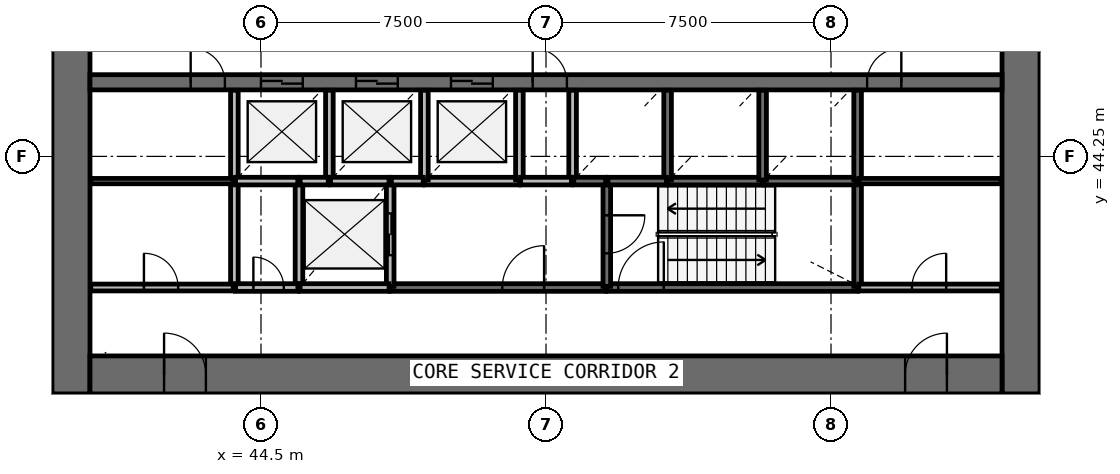
"""IFC4 building model, lengths in metres.
Left out: names, types, materials, properties, quantities, classifications, styles, units other than length and angle.
Written with IfcOpenShell. Run it as: python <this file> out.ifc"""

import sys

from ifc_helpers import new_model, si_unit, direction, frame, frame_2d, origin, place, context, subcontext, project, spatial, rectangle, extrude, source, transform, mapped, element, fill, save


model = new_model("IFC4")
c1 = context("Model", 3, precision=1e-05, world=origin(), true_north=direction((0.0, 1.0)))
c2 = subcontext(c1, "Body", "Model", "MODEL_VIEW")
j1 = project(units=[si_unit("LENGTHUNIT", "METRE"), si_unit("PLANEANGLEUNIT", "RADIAN")], contexts=[c1])
p1 = place(None, origin())
s1 = spatial("IfcSite", under=j1, at=p1, CompositionType="ELEMENT")
p2 = place(p1, origin())
s2 = spatial("IfcBuilding", under=s1, at=p2, CompositionType="ELEMENT")
p3 = place(p2, frame((0.0, 0.0, 71.0)))
s3 = spatial("IfcBuildingStorey", under=s2, at=p3, CompositionType="ELEMENT", Elevation=71.0)
p4 = place(p3, frame((64.5, 38.0, 0.0), z_axis=(0.0, 0.0, 1.0), x_axis=(0.0, 1.0, 0.0)))
e1 = element("IfcWall", 1, at=p4, inside=s3, PredefinedType="SHEAR", context=c2, shape_type="SweptSolid", body=[
    extrude(rectangle(XDim=20.0, YDim=1.0, at=frame_2d((10.0, 0.0))), origin(), (0.0, 0.0, 1.0), 4.4),
])
p5 = place(p4, frame((9.1, 0.0, 0.0)))
e2 = element("IfcOpeningElement", 2, at=p5, cuts=e1, PredefinedType="OPENING", context=c2, shape_type="SweptSolid", body=[
    extrude(rectangle(XDim=1.8, YDim=2.1, at=frame_2d((0.9, 1.05))), frame((0.0, 0.51, 0.0), z_axis=(0.0, -1.0, 0.0), x_axis=(1.0, 0.0, 0.0)), (0.0, 0.0, 1.0), 1.02),
])
p6 = place(p3, frame((39.5, 58.0, 0.0), z_axis=(0.0, 0.0, 1.0), x_axis=(0.0, -1.0, 0.0)))
e3 = element("IfcWall", 3, at=p6, inside=s3, PredefinedType="SHEAR", context=c2, shape_type="SweptSolid", body=[
    extrude(rectangle(XDim=20.0, YDim=1.0, at=frame_2d((10.0, 0.0))), origin(), (0.0, 0.0, 1.0), 4.4),
])
p7 = place(p6, frame((9.1, 0.0, 0.0)))
e4 = element("IfcOpeningElement", 4, at=p7, cuts=e3, PredefinedType="OPENING", context=c2, shape_type="SweptSolid", body=[
    extrude(rectangle(XDim=1.8, YDim=2.1, at=frame_2d((0.9, 1.05))), frame((0.0, 0.51, 0.0), z_axis=(0.0, -1.0, 0.0), x_axis=(1.0, 0.0, 0.0)), (0.0, 0.0, 1.0), 1.02),
])
p8 = place(p3, frame((40.0, 38.5, 0.0), z_axis=(0.0, 0.0, 1.0), x_axis=(1.0, 0.0, 0.0)))
e5 = element("IfcWall", 5, at=p8, inside=s3, PredefinedType="SHEAR", context=c2, shape_type="SweptSolid", body=[
    extrude(rectangle(XDim=24.0, YDim=1.0, at=frame_2d((12.0, 0.0))), origin(), (0.0, 0.0, 1.0), 4.4),
])
p9 = place(p8, frame((21.45, 0.0, 0.0)))
e6 = element("IfcOpeningElement", 6, at=p9, cuts=e5, PredefinedType="OPENING", context=c2, shape_type="SweptSolid", body=[
    extrude(rectangle(XDim=1.1, YDim=2.1, at=frame_2d((0.55, 1.05))), frame((0.0, 0.51, 0.0), z_axis=(0.0, -1.0, 0.0), x_axis=(1.0, 0.0, 0.0)), (0.0, 0.0, 1.0), 1.02),
])
p10 = place(p8, frame((1.95, 0.0, 0.0)))
e7 = element("IfcOpeningElement", 7, at=p10, cuts=e5, PredefinedType="OPENING", context=c2, shape_type="SweptSolid", body=[
    extrude(rectangle(XDim=1.1, YDim=2.1, at=frame_2d((0.55, 1.05))), frame((0.0, 0.51, 0.0), z_axis=(0.0, -1.0, 0.0), x_axis=(1.0, 0.0, 0.0)), (0.0, 0.0, 1.0), 1.02),
])
p11 = place(p3, frame((40.0, 46.2, 0.0), z_axis=(0.0, 0.0, 1.0), x_axis=(1.0, 0.0, 0.0)))
e8 = element("IfcWall", 8, at=p11, inside=s3, PredefinedType="SHEAR", context=c2, shape_type="SweptSolid", body=[
    extrude(rectangle(XDim=24.0, YDim=0.4, at=frame_2d((12.0, 0.0))), origin(), (0.0, 0.0, 1.0), 4.4),
])
p12 = place(p11, frame((4.5, 0.0, 0.0)))
e9 = element("IfcOpeningElement", 9, at=p12, cuts=e8, PredefinedType="OPENING", context=c2, shape_type="SweptSolid", body=[
    extrude(rectangle(XDim=1.1, YDim=2.1, at=frame_2d((0.55, 1.05))), frame((0.0, 0.21, 0.0), z_axis=(0.0, -1.0, 0.0), x_axis=(1.0, 0.0, 0.0)), (0.0, 0.0, 1.0), 0.42),
])
p13 = place(p11, frame((7.0, 0.0, 0.0)))
e10 = element("IfcOpeningElement", 10, at=p13, cuts=e8, PredefinedType="OPENING", context=c2, shape_type="SweptSolid", body=[
    extrude(rectangle(XDim=1.1, YDim=2.1, at=frame_2d((0.55, 1.05))), frame((0.0, 0.21, 0.0), z_axis=(0.0, -1.0, 0.0), x_axis=(1.0, 0.0, 0.0)), (0.0, 0.0, 1.0), 0.42),
])
p14 = place(p11, frame((9.5, 0.0, 0.0)))
e11 = element("IfcOpeningElement", 11, at=p14, cuts=e8, PredefinedType="OPENING", context=c2, shape_type="SweptSolid", body=[
    extrude(rectangle(XDim=1.1, YDim=2.1, at=frame_2d((0.55, 1.05))), frame((0.0, 0.21, 0.0), z_axis=(0.0, -1.0, 0.0), x_axis=(1.0, 0.0, 0.0)), (0.0, 0.0, 1.0), 0.42),
])
p15 = place(p11, frame((20.45, 0.0, 0.0)))
e12 = element("IfcOpeningElement", 12, at=p15, cuts=e8, PredefinedType="OPENING", context=c2, shape_type="SweptSolid", body=[
    extrude(rectangle(XDim=0.9, YDim=2.1, at=frame_2d((0.45, 1.05))), frame((0.0, 0.21, 0.0), z_axis=(0.0, -1.0, 0.0), x_axis=(1.0, 0.0, 0.0)), (0.0, 0.0, 1.0), 0.42),
])
p16 = place(p11, frame((2.65, 0.0, 0.0)))
e13 = element("IfcOpeningElement", 13, at=p16, cuts=e8, PredefinedType="OPENING", context=c2, shape_type="SweptSolid", body=[
    extrude(rectangle(XDim=0.9, YDim=2.1, at=frame_2d((0.45, 1.05))), frame((0.0, 0.21, 0.0), z_axis=(0.0, -1.0, 0.0), x_axis=(1.0, 0.0, 0.0)), (0.0, 0.0, 1.0), 0.42),
])
p17 = place(p11, frame((11.65, 0.0, 0.0)))
e14 = element("IfcOpeningElement", 14, at=p17, cuts=e8, PredefinedType="OPENING", context=c2, shape_type="SweptSolid", body=[
    extrude(rectangle(XDim=0.9, YDim=2.1, at=frame_2d((0.45, 1.05))), frame((0.0, 0.21, 0.0), z_axis=(0.0, -1.0, 0.0), x_axis=(1.0, 0.0, 0.0)), (0.0, 0.0, 1.0), 0.42),
])
p18 = place(p3, frame((53.6, 40.8, 0.0), z_axis=(0.0, 0.0, 1.0), x_axis=(1.0, 0.0, 0.0)))
e15 = element("IfcWall", 15, at=p18, inside=s3, PredefinedType="SOLIDWALL", context=c2, shape_type="SweptSolid", body=[
    extrude(rectangle(XDim=6.6, YDim=0.2, at=frame_2d((3.3, 0.0))), origin(), (0.0, 0.0, 1.0), 3.9),
])
p19 = place(p18, frame((0.3, 0.0, 0.0)))
e16 = element("IfcOpeningElement", 16, at=p19, cuts=e15, PredefinedType="OPENING", context=c2, shape_type="SweptSolid", body=[
    extrude(rectangle(XDim=1.2, YDim=2.1, at=frame_2d((0.6, 1.05))), frame((0.0, 0.11, 0.0), z_axis=(0.0, -1.0, 0.0), x_axis=(1.0, 0.0, 0.0)), (0.0, 0.0, 1.0), 0.22),
])
p20 = place(p3, frame((47.9, 40.8, 0.0), z_axis=(0.0, 0.0, 1.0), x_axis=(1.0, 0.0, 0.0)))
e17 = element("IfcWall", 17, at=p20, inside=s3, PredefinedType="SOLIDWALL", context=c2, shape_type="SweptSolid", body=[
    extrude(rectangle(XDim=5.67, YDim=0.2, at=frame_2d((2.835, 0.0))), origin(), (0.0, 0.0, 1.0), 3.9),
])
p21 = place(p20, frame((2.95, 0.0, 0.0)))
e18 = element("IfcOpeningElement", 18, at=p21, cuts=e17, PredefinedType="OPENING", context=c2, shape_type="SweptSolid", body=[
    extrude(rectangle(XDim=1.1, YDim=2.1, at=frame_2d((0.55, 1.05))), frame((0.0, 0.11, 0.0), z_axis=(0.0, -1.0, 0.0), x_axis=(1.0, 0.0, 0.0)), (0.0, 0.0, 1.0), 0.22),
])
for number, where, z_axis, x_axis in (
    (19, (43.8, 43.6, 0.0), (0.0, 0.0, 1.0), (0.0, -1.0, 0.0)),
    (20, (45.5, 43.6, 0.0), (0.0, 0.0, 1.0), (0.0, -1.0, 0.0)),
):
    element("IfcWall", number, at=place(p3, frame(where, z_axis=z_axis, x_axis=x_axis)), inside=s3, PredefinedType="SOLIDWALL", context=c2, shape_type="SweptSolid", body=[
        extrude(rectangle(XDim=2.8, YDim=0.2, at=frame_2d((1.4, 0.0))), origin(), (0.0, 0.0, 1.0), 3.9),
    ])
p22 = place(p3, frame((47.9, 40.83, 0.0), z_axis=(0.0, 0.0, 1.0), x_axis=(0.0, 1.0, 0.0)))
e21 = element("IfcWall", 21, at=p22, inside=s3, PredefinedType="SOLIDWALL", context=c2, shape_type="SweptSolid", body=[
    extrude(rectangle(XDim=2.77, YDim=0.2, at=frame_2d((1.385, 0.0))), origin(), (0.0, 0.0, 1.0), 3.9),
])
p23 = place(p22, frame((0.82, 0.0, 0.0)))
e22 = element("IfcOpeningElement", 22, at=p23, cuts=e21, PredefinedType="OPENING", context=c2, shape_type="SweptSolid", body=[
    extrude(rectangle(XDim=1.1, YDim=2.1, at=frame_2d((0.55, 1.05))), frame((0.0, 0.11, 0.0), z_axis=(0.0, -1.0, 0.0), x_axis=(1.0, 0.0, 0.0)), (0.0, 0.0, 1.0), 0.22),
])
p24 = place(p3, frame((60.2, 40.83, 0.0), z_axis=(0.0, 0.0, 1.0), x_axis=(0.0, 1.0, 0.0)))
e23 = element("IfcWall", 23, at=p24, inside=s3, PredefinedType="SOLIDWALL", context=c2, shape_type="SweptSolid", body=[
    extrude(rectangle(XDim=2.77, YDim=0.2, at=frame_2d((1.385, 0.0))), origin(), (0.0, 0.0, 1.0), 3.9),
])
p25 = place(p3, frame((53.6, 43.6, 0.0), z_axis=(0.0, 0.0, 1.0), x_axis=(0.0, -1.0, 0.0)))
e24 = element("IfcWall", 24, at=p25, inside=s3, PredefinedType="SOLIDWALL", context=c2, shape_type="SweptSolid", body=[
    extrude(rectangle(XDim=2.77, YDim=0.2, at=frame_2d((1.385, 0.0))), origin(), (0.0, 0.0, 1.0), 3.9),
])
p26 = place(p25, frame((0.9, 0.0, 0.0)))
e25 = element("IfcOpeningElement", 25, at=p26, cuts=e24, PredefinedType="OPENING", context=c2, shape_type="SweptSolid", body=[
    extrude(rectangle(XDim=1.0, YDim=2.1, at=frame_2d((0.5, 1.05))), frame((0.0, 0.11, 0.0), z_axis=(0.0, -1.0, 0.0), x_axis=(1.0, 0.0, 0.0)), (0.0, 0.0, 1.0), 0.22),
])
for number, where, z_axis, x_axis in (
    (26, (48.8, 43.6, 0.0), (0.0, 0.0, 1.0), (1.0, 0.0, 0.0)),
    (27, (55.2, 43.6, 0.0), (0.0, 0.0, 1.0), (1.0, 0.0, 0.0)),
):
    element("IfcWall", number, at=place(p3, frame(where, z_axis=z_axis, x_axis=x_axis)), inside=s3, PredefinedType="SOLIDWALL", context=c2, shape_type="SweptSolid", body=[
        extrude(rectangle(XDim=2.5, YDim=0.2, at=frame_2d((1.25, 0.0))), origin(), (0.0, 0.0, 1.0), 3.9),
    ])
p27 = place(p3, frame((57.73, 43.6, 0.0), z_axis=(0.0, 0.0, 1.0), x_axis=(1.0, 0.0, 0.0)))
e28 = element("IfcWall", 28, at=p27, inside=s3, PredefinedType="SOLIDWALL", context=c2, shape_type="SweptSolid", body=[
    extrude(rectangle(XDim=2.44, YDim=0.2, at=frame_2d((1.22, 0.0))), origin(), (0.0, 0.0, 1.0), 3.9),
])
p28 = place(p3, frame((45.53, 40.8, 0.0), z_axis=(0.0, 0.0, 1.0), x_axis=(1.0, 0.0, 0.0)))
e29 = element("IfcWall", 29, at=p28, inside=s3, PredefinedType="SOLIDWALL", context=c2, shape_type="SweptSolid", body=[
    extrude(rectangle(XDim=2.34, YDim=0.2, at=frame_2d((1.17, 0.0))), origin(), (0.0, 0.0, 1.0), 3.9),
])
p29 = place(p3, frame((43.8, 45.99, 0.0), z_axis=(0.0, 0.0, 1.0), x_axis=(0.0, -1.0, 0.0)))
e30 = element("IfcWall", 30, at=p29, inside=s3, PredefinedType="SOLIDWALL", context=c2, shape_type="SweptSolid", body=[
    extrude(rectangle(XDim=2.36, YDim=0.2, at=frame_2d((1.18, 0.0))), origin(), (0.0, 0.0, 1.0), 3.9),
])
p30 = place(p3, frame((46.3, 43.6, 0.0), z_axis=(0.0, 0.0, 1.0), x_axis=(0.0, 1.0, 0.0)))
e31 = element("IfcWall", 31, at=p30, inside=s3, PredefinedType="SOLIDWALL", context=c2, shape_type="SweptSolid", body=[
    extrude(rectangle(XDim=2.39, YDim=0.2, at=frame_2d((1.195, 0.0))), origin(), (0.0, 0.0, 1.0), 3.9),
])
for number, where, z_axis, x_axis in (
    (32, (48.8, 43.63, 0.0), (0.0, 0.0, 1.0), (0.0, 1.0, 0.0)),
    (33, (51.3, 43.63, 0.0), (0.0, 0.0, 1.0), (0.0, 1.0, 0.0)),
):
    element("IfcWall", number, at=place(p3, frame(where, z_axis=z_axis, x_axis=x_axis)), inside=s3, PredefinedType="SOLIDWALL", context=c2, shape_type="SweptSolid", body=[
        extrude(rectangle(XDim=2.36, YDim=0.2, at=frame_2d((1.18, 0.0))), origin(), (0.0, 0.0, 1.0), 3.9),
    ])
p31 = place(p3, frame((52.7, 45.99, 0.0), z_axis=(0.0, 0.0, 1.0), x_axis=(0.0, -1.0, 0.0)))
e34 = element("IfcWall", 34, at=p31, inside=s3, PredefinedType="SOLIDWALL", context=c2, shape_type="SweptSolid", body=[
    extrude(rectangle(XDim=2.39, YDim=0.2, at=frame_2d((1.195, 0.0))), origin(), (0.0, 0.0, 1.0), 3.9),
])
for number, where, z_axis, x_axis in (
    (35, (55.2, 43.63, 0.0), (0.0, 0.0, 1.0), (0.0, 1.0, 0.0)),
    (36, (57.7, 43.63, 0.0), (0.0, 0.0, 1.0), (0.0, 1.0, 0.0)),
    (37, (60.2, 43.63, 0.0), (0.0, 0.0, 1.0), (0.0, 1.0, 0.0)),
):
    element("IfcWall", number, at=place(p3, frame(where, z_axis=z_axis, x_axis=x_axis)), inside=s3, PredefinedType="SOLIDWALL", context=c2, shape_type="SweptSolid", body=[
        extrude(rectangle(XDim=2.36, YDim=0.2, at=frame_2d((1.18, 0.0))), origin(), (0.0, 0.0, 1.0), 3.9),
    ])
p32 = place(p3, frame((43.83, 43.6, 0.0), z_axis=(0.0, 0.0, 1.0), x_axis=(1.0, 0.0, 0.0)))
e38 = element("IfcWall", 38, at=p32, inside=s3, PredefinedType="SOLIDWALL", context=c2, shape_type="SweptSolid", body=[
    extrude(rectangle(XDim=1.64, YDim=0.2, at=frame_2d((0.82, 0.0))), origin(), (0.0, 0.0, 1.0), 3.9),
])
p33 = place(p3, frame((43.83, 40.8, 0.0), z_axis=(0.0, 0.0, 1.0), x_axis=(1.0, 0.0, 0.0)))
e39 = element("IfcWall", 39, at=p33, inside=s3, PredefinedType="SOLIDWALL", context=c2, shape_type="SweptSolid", body=[
    extrude(rectangle(XDim=1.64, YDim=0.2, at=frame_2d((0.82, 0.0))), origin(), (0.0, 0.0, 1.0), 3.9),
])
p34 = place(p33, frame((0.47, 0.0, 0.0)))
e40 = element("IfcOpeningElement", 40, at=p34, cuts=e39, PredefinedType="OPENING", context=c2, shape_type="SweptSolid", body=[
    extrude(rectangle(XDim=0.8, YDim=2.1, at=frame_2d((0.4, 1.05))), frame((0.0, 0.11, 0.0), z_axis=(0.0, -1.0, 0.0), x_axis=(1.0, 0.0, 0.0)), (0.0, 0.0, 1.0), 0.22),
])
for number, where, z_axis, x_axis in (
    (41, (46.33, 43.6, 0.0), (0.0, 0.0, 1.0), (1.0, 0.0, 0.0)),
    (42, (53.63, 43.6, 0.0), (0.0, 0.0, 1.0), (1.0, 0.0, 0.0)),
):
    element("IfcWall", number, at=place(p3, frame(where, z_axis=z_axis, x_axis=x_axis)), inside=s3, PredefinedType="SOLIDWALL", context=c2, shape_type="SweptSolid", body=[
        extrude(rectangle(XDim=1.54, YDim=0.2, at=frame_2d((0.77, 0.0))), origin(), (0.0, 0.0, 1.0), 3.9),
    ])
p35 = place(p3, frame((52.67, 43.6, 0.0), z_axis=(0.0, 0.0, 1.0), x_axis=(-1.0, 0.0, 0.0)))
e43 = element("IfcWall", 43, at=p35, inside=s3, PredefinedType="SOLIDWALL", context=c2, shape_type="SweptSolid", body=[
    extrude(rectangle(XDim=1.34, YDim=0.2, at=frame_2d((0.67, 0.0))), origin(), (0.0, 0.0, 1.0), 3.9),
])
for number, where, z_axis, x_axis in (
    (44, (47.93, 43.6, 0.0), (0.0, 0.0, 1.0), (1.0, 0.0, 0.0)),
    (45, (52.73, 43.6, 0.0), (0.0, 0.0, 1.0), (1.0, 0.0, 0.0)),
):
    element("IfcWall", number, at=place(p3, frame(where, z_axis=z_axis, x_axis=x_axis)), inside=s3, PredefinedType="SOLIDWALL", context=c2, shape_type="SweptSolid", body=[
        extrude(rectangle(XDim=0.84, YDim=0.2, at=frame_2d((0.42, 0.0))), origin(), (0.0, 0.0, 1.0), 3.9),
    ])
p36 = place(p3, frame((45.53, 43.6, 0.0), z_axis=(0.0, 0.0, 1.0), x_axis=(1.0, 0.0, 0.0)))
e46 = element("IfcWall", 46, at=p36, inside=s3, PredefinedType="SOLIDWALL", context=c2, shape_type="SweptSolid", body=[
    extrude(rectangle(XDim=0.74, YDim=0.2, at=frame_2d((0.37, 0.0))), origin(), (0.0, 0.0, 1.0), 3.9),
])
p37 = place(p3, frame((40.02, 40.8, 0.0), z_axis=(0.0, 0.0, 1.0), x_axis=(1.0, 0.0, 0.0)))
e47 = element("IfcWall", 47, at=p37, inside=s3, PredefinedType="PARTITIONING", context=c2, shape_type="SweptSolid", body=[
    extrude(rectangle(XDim=3.75, YDim=0.18, at=frame_2d((1.875, 0.0))), origin(), (0.0, 0.0, 1.0), 3.9),
])
p38 = place(p37, frame((1.4, 0.0, 0.0)))
e48 = element("IfcOpeningElement", 48, at=p38, cuts=e47, PredefinedType="OPENING", context=c2, shape_type="SweptSolid", body=[
    extrude(rectangle(XDim=0.9, YDim=2.1, at=frame_2d((0.45, 1.05))), frame((0.0, 0.1, 0.0), z_axis=(0.0, -1.0, 0.0), x_axis=(1.0, 0.0, 0.0)), (0.0, 0.0, 1.0), 0.2),
])
p39 = place(p3, frame((60.23, 40.8, 0.0), z_axis=(0.0, 0.0, 1.0), x_axis=(1.0, 0.0, 0.0)))
e49 = element("IfcWall", 49, at=p39, inside=s3, PredefinedType="PARTITIONING", context=c2, shape_type="SweptSolid", body=[
    extrude(rectangle(XDim=3.75, YDim=0.18, at=frame_2d((1.875, 0.0))), origin(), (0.0, 0.0, 1.0), 3.9),
])
p40 = place(p39, frame((1.4, 0.0, 0.0)))
e50 = element("IfcOpeningElement", 50, at=p40, cuts=e49, PredefinedType="OPENING", context=c2, shape_type="SweptSolid", body=[
    extrude(rectangle(XDim=0.9, YDim=2.1, at=frame_2d((0.45, 1.05))), frame((0.0, 0.1, 0.0), z_axis=(0.0, -1.0, 0.0), x_axis=(1.0, 0.0, 0.0)), (0.0, 0.0, 1.0), 0.2),
])
for number, where, z_axis, x_axis in (
    (51, (43.77, 43.6, 0.0), (0.0, 0.0, 1.0), (-1.0, 0.0, 0.0)),
    (52, (60.23, 43.6, 0.0), (0.0, 0.0, 1.0), (1.0, 0.0, 0.0)),
):
    element("IfcWall", number, at=place(p3, frame(where, z_axis=z_axis, x_axis=x_axis)), inside=s3, PredefinedType="PARTITIONING", context=c2, shape_type="SweptSolid", body=[
        extrude(rectangle(XDim=3.75, YDim=0.14, at=frame_2d((1.875, 0.0))), origin(), (0.0, 0.0, 1.0), 3.0),
    ])
m1 = source(origin(), c2, "Body", "SweptSolid", [
    extrude(rectangle(XDim=1.1, YDim=2.1, at=frame_2d((0.55, 1.05))), frame((0.0, 0.025, 0.0), z_axis=(0.0, -1.0, 0.0), x_axis=(1.0, 0.0, 0.0)), (0.0, 0.0, 1.0), 0.05),
])
p41 = place(p12, origin())
e53 = element("IfcDoor", 53, at=p41, inside=s3, OperationType="DOUBLE_DOOR_SLIDING", PredefinedType="USERDEFINED", context=c2, shape_type="MappedRepresentation", body=[
    mapped(m1, transform((0.0, 0.0, 0.0), scale=1.0)),
])
fill(e9, e53)
p42 = place(p13, origin())
e54 = element("IfcDoor", 54, at=p42, inside=s3, OperationType="DOUBLE_DOOR_SLIDING", PredefinedType="USERDEFINED", context=c2, shape_type="MappedRepresentation", body=[
    mapped(m1, transform((0.0, 0.0, 0.0), scale=1.0)),
])
fill(e10, e54)
p43 = place(p14, origin())
e55 = element("IfcDoor", 55, at=p43, inside=s3, OperationType="DOUBLE_DOOR_SLIDING", PredefinedType="USERDEFINED", context=c2, shape_type="MappedRepresentation", body=[
    mapped(m1, transform((0.0, 0.0, 0.0), scale=1.0)),
])
fill(e11, e55)
p44 = place(p23, origin())
e56 = element("IfcDoor", 56, at=p44, inside=s3, OperationType="DOUBLE_DOOR_SLIDING", PredefinedType="USERDEFINED", context=c2, shape_type="MappedRepresentation", body=[
    mapped(m1, transform((0.0, 0.0, 0.0), scale=1.0)),
])
fill(e22, e56)
m2 = source(origin(), c2, "Body", "SweptSolid", [
    extrude(rectangle(XDim=1.2, YDim=2.1, at=frame_2d((0.6, 1.05))), frame((0.0, 0.025, 0.0), z_axis=(0.0, -1.0, 0.0), x_axis=(1.0, 0.0, 0.0)), (0.0, 0.0, 1.0), 0.05),
])
p45 = place(p19, origin())
e57 = element("IfcDoor", 57, at=p45, inside=s3, OperationType="SINGLE_SWING_RIGHT", PredefinedType="DOOR", context=c2, shape_type="MappedRepresentation", body=[
    mapped(m2, transform((0.0, 0.0, 0.0), scale=1.0)),
])
fill(e16, e57)
m3 = source(origin(), c2, "Body", "SweptSolid", [
    extrude(rectangle(XDim=1.0, YDim=2.1, at=frame_2d((0.5, 1.05))), frame((0.0, 0.025, 0.0), z_axis=(0.0, -1.0, 0.0), x_axis=(1.0, 0.0, 0.0)), (0.0, 0.0, 1.0), 0.05),
])
p46 = place(p26, origin())
e58 = element("IfcDoor", 58, at=p46, inside=s3, OperationType="SINGLE_SWING_LEFT", PredefinedType="DOOR", context=c2, shape_type="MappedRepresentation", body=[
    mapped(m3, transform((0.0, 0.0, 0.0), scale=1.0)),
])
fill(e25, e58)
m4 = source(origin(), c2, "Body", "SweptSolid", [
    extrude(rectangle(XDim=1.1, YDim=2.1, at=frame_2d((0.55, 1.05))), frame((0.0, 0.025, 0.0), z_axis=(0.0, -1.0, 0.0), x_axis=(1.0, 0.0, 0.0)), (0.0, 0.0, 1.0), 0.05),
])
p47 = place(p21, origin())
e59 = element("IfcDoor", 59, at=p47, inside=s3, OperationType="SINGLE_SWING_RIGHT", PredefinedType="DOOR", context=c2, shape_type="MappedRepresentation", body=[
    mapped(m4, transform((0.0, 0.0, 0.0), scale=1.0)),
])
fill(e18, e59)
m5 = source(origin(), c2, "Body", "SweptSolid", [
    extrude(rectangle(XDim=0.8, YDim=2.1, at=frame_2d((0.4, 1.05))), frame((0.0, 0.025, 0.0), z_axis=(0.0, -1.0, 0.0), x_axis=(1.0, 0.0, 0.0)), (0.0, 0.0, 1.0), 0.05),
])
p48 = place(p34, origin())
e60 = element("IfcDoor", 60, at=p48, inside=s3, OperationType="SINGLE_SWING_LEFT", PredefinedType="DOOR", context=c2, shape_type="MappedRepresentation", body=[
    mapped(m5, transform((0.0, 0.0, 0.0), scale=1.0)),
])
fill(e40, e60)
m6 = source(origin(), c2, "Body", "SweptSolid", [
    extrude(rectangle(XDim=1.1, YDim=2.1, at=frame_2d((0.55, 1.05))), frame((0.0, 0.025, 0.0), z_axis=(0.0, -1.0, 0.0), x_axis=(1.0, 0.0, 0.0)), (0.0, 0.0, 1.0), 0.05),
])
p49 = place(p9, origin())
e61 = element("IfcDoor", 61, at=p49, inside=s3, OperationType="SINGLE_SWING_RIGHT", PredefinedType="DOOR", context=c2, shape_type="MappedRepresentation", body=[
    mapped(m6, transform((0.0, 0.0, 0.0), scale=1.0)),
])
fill(e6, e61)
p50 = place(p10, origin())
e62 = element("IfcDoor", 62, at=p50, inside=s3, OperationType="SINGLE_SWING_LEFT", PredefinedType="DOOR", context=c2, shape_type="MappedRepresentation", body=[
    mapped(m6, transform((0.0, 0.0, 0.0), scale=1.0)),
])
fill(e7, e62)
m7 = source(origin(), c2, "Body", "SweptSolid", [
    extrude(rectangle(XDim=0.9, YDim=2.1, at=frame_2d((0.45, 1.05))), frame((0.0, 0.025, 0.0), z_axis=(0.0, -1.0, 0.0), x_axis=(1.0, 0.0, 0.0)), (0.0, 0.0, 1.0), 0.05),
])
p51 = place(p38, origin())
e63 = element("IfcDoor", 63, at=p51, inside=s3, OperationType="SINGLE_SWING_LEFT", PredefinedType="DOOR", context=c2, shape_type="MappedRepresentation", body=[
    mapped(m7, transform((0.0, 0.0, 0.0), scale=1.0)),
])
fill(e48, e63)
p52 = place(p15, origin())
e64 = element("IfcDoor", 64, at=p52, inside=s3, OperationType="SINGLE_SWING_RIGHT", PredefinedType="DOOR", context=c2, shape_type="MappedRepresentation", body=[
    mapped(m7, transform((0.0, 0.0, 0.0), scale=1.0)),
])
fill(e12, e64)
p53 = place(p40, origin())
e65 = element("IfcDoor", 65, at=p53, inside=s3, OperationType="SINGLE_SWING_RIGHT", PredefinedType="DOOR", context=c2, shape_type="MappedRepresentation", body=[
    mapped(m7, transform((0.0, 0.0, 0.0), scale=1.0)),
])
fill(e50, e65)
p54 = place(p16, origin())
e66 = element("IfcDoor", 66, at=p54, inside=s3, OperationType="SINGLE_SWING_LEFT", PredefinedType="DOOR", context=c2, shape_type="MappedRepresentation", body=[
    mapped(m7, transform((0.0, 0.0, 0.0), scale=1.0)),
])
fill(e13, e66)
p55 = place(p17, origin())
e67 = element("IfcDoor", 67, at=p55, inside=s3, OperationType="SINGLE_SWING_LEFT", PredefinedType="DOOR", context=c2, shape_type="MappedRepresentation", body=[
    mapped(m7, transform((0.0, 0.0, 0.0), scale=1.0)),
])
fill(e14, e67)
save(model, sys.argv[1])
